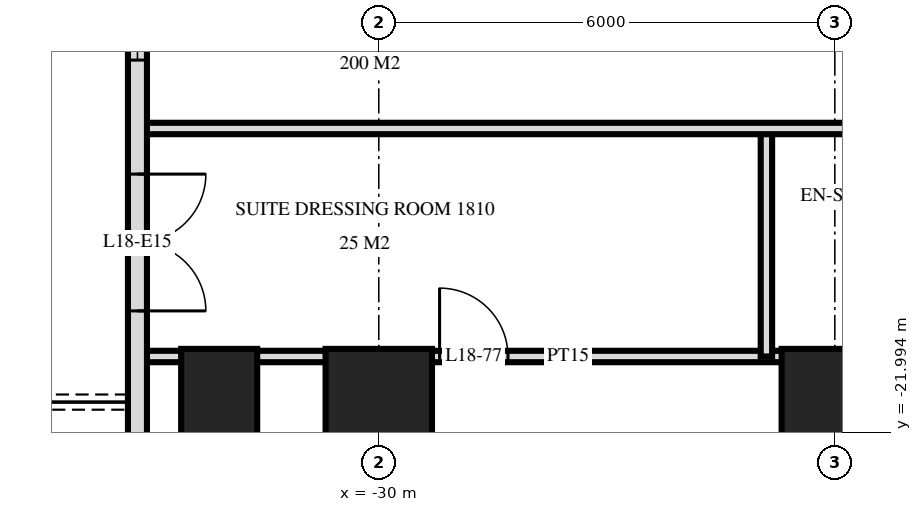
"""IFC4 building model, lengths in metres.
Left out: names, types, materials, properties, quantities, classifications, styles, units other than length and angle.
Written with IfcOpenShell. Run it as: python <this file> out.ifc"""

import sys

from ifc_helpers import new_model, si_unit, direction, frame, frame_2d, origin, origin_2d, place, context, subcontext, project, spatial, rectangle, extrude, element, fill, save


model = new_model("IFC4")
c1 = context("Model", 3, precision=1e-05, world=origin(), true_north=direction((0.0, 1.0)))
c2 = subcontext(c1, "Body", "Model", "MODEL_VIEW")
j1 = project(units=[si_unit("LENGTHUNIT", "METRE"), si_unit("PLANEANGLEUNIT", "RADIAN")], contexts=[c1])
p1 = place(None, origin())
s1 = spatial("IfcSite", under=j1, at=p1, CompositionType="ELEMENT")
p2 = place(p1, origin())
s2 = spatial("IfcBuilding", under=s1, at=p2, CompositionType="ELEMENT")
p3 = place(p2, frame((0.0, 0.0, 74.4)))
s3 = spatial("IfcBuildingStorey", under=s2, at=p3, CompositionType="ELEMENT", Elevation=74.4)
p4 = place(p3, frame((-32.1, -21.6, 0.0), z_axis=(0.0, 0.0, 1.0), x_axis=(0.0, 1.0, 0.0)))
e1 = element("IfcColumn", 1, at=p4, inside=s3, PredefinedType="COLUMN", context=c2, shape_type="SweptSolid", body=[
    extrude(rectangle(XDim=1.4, YDim=1.0, at=origin_2d()), origin(), (0.0, 0.0, 1.0), 3.6),
])
for number, where, z_axis, x_axis in (
    (2, (-30.0, -21.6, 0.0), (0.0, 0.0, 1.0), (1.0, 0.0, 0.0)),
    (3, (-24.0, -21.6, 0.0), (0.0, 0.0, 1.0), (1.0, 0.0, 0.0)),
):
    element("IfcColumn", number, at=place(p3, frame(where, z_axis=z_axis, x_axis=x_axis)), inside=s3, PredefinedType="COLUMN", context=c2, shape_type="SweptSolid", body=[
        extrude(rectangle(XDim=1.4, YDim=1.4, at=origin_2d()), origin(), (0.0, 0.0, 1.0), 3.6),
    ])
p5 = place(p3, frame((-33.175, -3.325, 0.0), z_axis=(0.0, 0.0, 1.0), x_axis=(0.0, -1.0, 0.0)))
e4 = element("IfcWall", 4, at=p5, inside=s3, PredefinedType="SOLIDWALL", context=c2, shape_type="SweptSolid", body=[
    extrude(rectangle(XDim=21.551, YDim=0.25, at=frame_2d((10.775, 0.0))), origin(), (0.0, 0.0, 1.0), 3.32),
])
p6 = place(p5, frame((6.65, 0.0, 0.0)))
e5 = element("IfcOpeningElement", 5, at=p6, cuts=e4, PredefinedType="OPENING", context=c2, shape_type="SweptSolid", body=[
    extrude(rectangle(XDim=1.8, YDim=2.4, at=frame_2d((0.9, 1.2))), frame((0.0, 0.135, 0.0), z_axis=(0.0, -1.0, 0.0), x_axis=(1.0, 0.0, 0.0)), (0.0, 0.0, 1.0), 0.27),
])
p7 = place(p5, frame((12.575, 0.0, 0.3)))
e6 = element("IfcOpeningElement", 6, at=p7, cuts=e4, PredefinedType="OPENING", context=c2, shape_type="SweptSolid", body=[
    extrude(rectangle(XDim=1.2, YDim=2.1, at=frame_2d((0.6, 1.05))), frame((0.0, 0.135, 0.0), z_axis=(0.0, -1.0, 0.0), x_axis=(1.0, 0.0, 0.0)), (0.0, 0.0, 1.0), 0.27),
])
p8 = place(p5, frame((15.275, 0.0, 0.0)))
e7 = element("IfcOpeningElement", 7, at=p8, cuts=e4, PredefinedType="OPENING", context=c2, shape_type="SweptSolid", body=[
    extrude(rectangle(XDim=1.8, YDim=2.4, at=frame_2d((0.9, 1.2))), frame((0.0, 0.135, 0.0), z_axis=(0.0, -1.0, 0.0), x_axis=(1.0, 0.0, 0.0)), (0.0, 0.0, 1.0), 0.27),
])
p9 = place(p5, frame((18.875, 0.0, 0.0)))
e8 = element("IfcOpeningElement", 8, at=p9, cuts=e4, PredefinedType="OPENING", context=c2, shape_type="SweptSolid", body=[
    extrude(rectangle(XDim=1.8, YDim=2.4, at=frame_2d((0.9, 1.2))), frame((0.0, 0.135, 0.0), z_axis=(0.0, -1.0, 0.0), x_axis=(1.0, 0.0, 0.0)), (0.0, 0.0, 1.0), 0.27),
])
p10 = place(p3, frame((-24.0, -29.22, 0.0), z_axis=(0.0, 0.0, 1.0), x_axis=(0.0, 1.0, 0.0)))
e9 = element("IfcWall", 9, at=p10, inside=s3, PredefinedType="PARTITIONING", context=c2, shape_type="SweptSolid", body=[
    extrude(rectangle(XDim=8.22, YDim=0.15, at=frame_2d((4.11, 0.0))), origin(), (0.0, 0.0, 1.0), 3.32),
])
p11 = place(p10, frame((3.59, 0.0, 0.0)))
e10 = element("IfcOpeningElement", 10, at=p11, cuts=e9, PredefinedType="OPENING", context=c2, shape_type="SweptSolid", body=[
    extrude(rectangle(XDim=0.9, YDim=2.1, at=frame_2d((0.45, 1.05))), frame((0.0, 0.085, 0.0), z_axis=(0.0, -1.0, 0.0), x_axis=(1.0, 0.0, 0.0)), (0.0, 0.0, 1.0), 0.17),
])
p12 = place(p3, frame((-24.9, -21.0, 0.0), z_axis=(0.0, 0.0, 1.0), x_axis=(0.0, 1.0, 0.0)))
e11 = element("IfcWall", 11, at=p12, inside=s3, PredefinedType="PARTITIONING", context=c2, shape_type="SweptSolid", body=[
    extrude(rectangle(XDim=3.0, YDim=0.15, at=frame_2d((1.5, 0.0))), origin(), (0.0, 0.0, 1.0), 3.32),
])
p13 = place(p3, frame((-33.12, -21.0, 0.0), z_axis=(0.0, 0.0, 1.0), x_axis=(1.0, 0.0, 0.0)))
e12 = element("IfcWall", 12, at=p13, inside=s3, PredefinedType="PARTITIONING", context=c2, shape_type="SweptSolid", body=[
    extrude(rectangle(XDim=11.22, YDim=0.15, at=frame_2d((5.61, 0.0))), origin(), (0.0, 0.0, 1.0), 3.32),
])
p14 = place(p13, frame((9.92, 0.0, 0.0)))
e13 = element("IfcOpeningElement", 13, at=p14, cuts=e12, PredefinedType="OPENING", context=c2, shape_type="SweptSolid", body=[
    extrude(rectangle(XDim=0.8, YDim=2.1, at=frame_2d((0.4, 1.05))), frame((0.0, 0.085, 0.0), z_axis=(0.0, -1.0, 0.0), x_axis=(1.0, 0.0, 0.0)), (0.0, 0.0, 1.0), 0.17),
])
p15 = place(p13, frame((3.92, 0.0, 0.0)))
e14 = element("IfcOpeningElement", 14, at=p15, cuts=e12, PredefinedType="OPENING", context=c2, shape_type="SweptSolid", body=[
    extrude(rectangle(XDim=0.9, YDim=2.1, at=frame_2d((0.45, 1.05))), frame((0.0, 0.085, 0.0), z_axis=(0.0, -1.0, 0.0), x_axis=(1.0, 0.0, 0.0)), (0.0, 0.0, 1.0), 0.17),
])
p16 = place(p3, frame((-33.12, -18.0, 0.0), z_axis=(0.0, 0.0, 1.0), x_axis=(1.0, 0.0, 0.0)))
e15 = element("IfcWall", 15, at=p16, inside=s3, PredefinedType="PARTITIONING", context=c2, shape_type="SweptSolid", body=[
    extrude(rectangle(XDim=66.24, YDim=0.15, at=frame_2d((33.12, 0.0))), origin(), (0.0, 0.0, 1.0), 3.32),
])
p17 = place(p16, frame((15.27, 0.0, 0.0)))
e16 = element("IfcOpeningElement", 16, at=p17, cuts=e15, PredefinedType="OPENING", context=c2, shape_type="SweptSolid", body=[
    extrude(rectangle(XDim=1.0, YDim=2.1, at=frame_2d((0.5, 1.05))), frame((0.0, 0.085, 0.0), z_axis=(0.0, -1.0, 0.0), x_axis=(1.0, 0.0, 0.0)), (0.0, 0.0, 1.0), 0.17),
])
p18 = place(p16, frame((21.22, 0.0, 0.0)))
e17 = element("IfcOpeningElement", 17, at=p18, cuts=e15, PredefinedType="OPENING", context=c2, shape_type="SweptSolid", body=[
    extrude(rectangle(XDim=1.0, YDim=2.1, at=frame_2d((0.5, 1.05))), frame((0.0, 0.085, 0.0), z_axis=(0.0, -1.0, 0.0), x_axis=(1.0, 0.0, 0.0)), (0.0, 0.0, 1.0), 0.17),
])
p19 = place(p16, frame((24.27, 0.0, 0.0)))
e18 = element("IfcOpeningElement", 18, at=p19, cuts=e15, PredefinedType="OPENING", context=c2, shape_type="SweptSolid", body=[
    extrude(rectangle(XDim=1.0, YDim=2.1, at=frame_2d((0.5, 1.05))), frame((0.0, 0.085, 0.0), z_axis=(0.0, -1.0, 0.0), x_axis=(1.0, 0.0, 0.0)), (0.0, 0.0, 1.0), 0.17),
])
p20 = place(p16, frame((30.97, 0.0, 0.0)))
e19 = element("IfcOpeningElement", 19, at=p20, cuts=e15, PredefinedType="OPENING", context=c2, shape_type="SweptSolid", body=[
    extrude(rectangle(XDim=1.0, YDim=2.1, at=frame_2d((0.5, 1.05))), frame((0.0, 0.085, 0.0), z_axis=(0.0, -1.0, 0.0), x_axis=(1.0, 0.0, 0.0)), (0.0, 0.0, 1.0), 0.17),
])
p21 = place(p16, frame((40.42, 0.0, 0.0)))
e20 = element("IfcOpeningElement", 20, at=p21, cuts=e15, PredefinedType="OPENING", context=c2, shape_type="SweptSolid", body=[
    extrude(rectangle(XDim=1.0, YDim=2.1, at=frame_2d((0.5, 1.05))), frame((0.0, 0.085, 0.0), z_axis=(0.0, -1.0, 0.0), x_axis=(1.0, 0.0, 0.0)), (0.0, 0.0, 1.0), 0.17),
])
p22 = place(p16, frame((43.97, 0.0, 0.0)))
e21 = element("IfcOpeningElement", 21, at=p22, cuts=e15, PredefinedType="OPENING", context=c2, shape_type="SweptSolid", body=[
    extrude(rectangle(XDim=1.0, YDim=2.1, at=frame_2d((0.5, 1.05))), frame((0.0, 0.085, 0.0), z_axis=(0.0, -1.0, 0.0), x_axis=(1.0, 0.0, 0.0)), (0.0, 0.0, 1.0), 0.17),
])
p23 = place(p16, frame((45.52, 0.0, 0.0)))
e22 = element("IfcOpeningElement", 22, at=p23, cuts=e15, PredefinedType="OPENING", context=c2, shape_type="SweptSolid", body=[
    extrude(rectangle(XDim=1.0, YDim=2.1, at=frame_2d((0.5, 1.05))), frame((0.0, 0.085, 0.0), z_axis=(0.0, -1.0, 0.0), x_axis=(1.0, 0.0, 0.0)), (0.0, 0.0, 1.0), 0.17),
])
p24 = place(p16, frame((52.97, 0.0, 0.0)))
e23 = element("IfcOpeningElement", 23, at=p24, cuts=e15, PredefinedType="OPENING", context=c2, shape_type="SweptSolid", body=[
    extrude(rectangle(XDim=1.0, YDim=2.1, at=frame_2d((0.5, 1.05))), frame((0.0, 0.085, 0.0), z_axis=(0.0, -1.0, 0.0), x_axis=(1.0, 0.0, 0.0)), (0.0, 0.0, 1.0), 0.17),
])
p25 = place(p16, frame((54.27, 0.0, 0.0)))
e24 = element("IfcOpeningElement", 24, at=p25, cuts=e15, PredefinedType="OPENING", context=c2, shape_type="SweptSolid", body=[
    extrude(rectangle(XDim=1.0, YDim=2.1, at=frame_2d((0.5, 1.05))), frame((0.0, 0.085, 0.0), z_axis=(0.0, -1.0, 0.0), x_axis=(1.0, 0.0, 0.0)), (0.0, 0.0, 1.0), 0.17),
])
p26 = place(p16, frame((13.42, 0.0, 0.0)))
e25 = element("IfcOpeningElement", 25, at=p26, cuts=e15, PredefinedType="OPENING", context=c2, shape_type="SweptSolid", body=[
    extrude(rectangle(XDim=1.0, YDim=2.1, at=frame_2d((0.5, 1.05))), frame((0.0, 0.085, 0.0), z_axis=(0.0, -1.0, 0.0), x_axis=(1.0, 0.0, 0.0)), (0.0, 0.0, 1.0), 0.17),
])
p27 = place(p16, frame((60.82, 0.0, 0.0)))
e26 = element("IfcOpeningElement", 26, at=p27, cuts=e15, PredefinedType="OPENING", context=c2, shape_type="SweptSolid", body=[
    extrude(rectangle(XDim=1.0, YDim=2.1, at=frame_2d((0.5, 1.05))), frame((0.0, 0.085, 0.0), z_axis=(0.0, -1.0, 0.0), x_axis=(1.0, 0.0, 0.0)), (0.0, 0.0, 1.0), 0.17),
])
p28 = place(p7, origin())
e27 = element("IfcWindow", 27, at=p28, inside=s3, PartitioningType="SINGLE_PANEL", PredefinedType="WINDOW", context=c2, shape_type="SweptSolid", body=[
    extrude(rectangle(XDim=1.2, YDim=2.1, at=frame_2d((0.6, 1.05))), frame((0.0, 0.03, 0.0), z_axis=(0.0, -1.0, 0.0), x_axis=(1.0, 0.0, 0.0)), (0.0, 0.0, 1.0), 0.06),
])
fill(e6, e27)
p29 = place(p8, origin())
e28 = element("IfcDoor", 28, at=p29, inside=s3, OperationType="DOUBLE_DOOR_SINGLE_SWING", PredefinedType="DOOR", context=c2, shape_type="SweptSolid", body=[
    extrude(rectangle(XDim=1.8, YDim=2.4, at=frame_2d((0.9, 1.2))), frame((0.0, 0.025, 0.0), z_axis=(0.0, -1.0, 0.0), x_axis=(1.0, 0.0, 0.0)), (0.0, 0.0, 1.0), 0.05),
])
fill(e7, e28)
p30 = place(p15, origin())
e29 = element("IfcDoor", 29, at=p30, inside=s3, OperationType="SINGLE_SWING_RIGHT", PredefinedType="DOOR", context=c2, shape_type="SweptSolid", body=[
    extrude(rectangle(XDim=0.9, YDim=2.1, at=frame_2d((0.45, 1.05))), frame((0.0, 0.025, 0.0), z_axis=(0.0, -1.0, 0.0), x_axis=(1.0, 0.0, 0.0)), (0.0, 0.0, 1.0), 0.05),
])
fill(e14, e29)
save(model, sys.argv[1])
